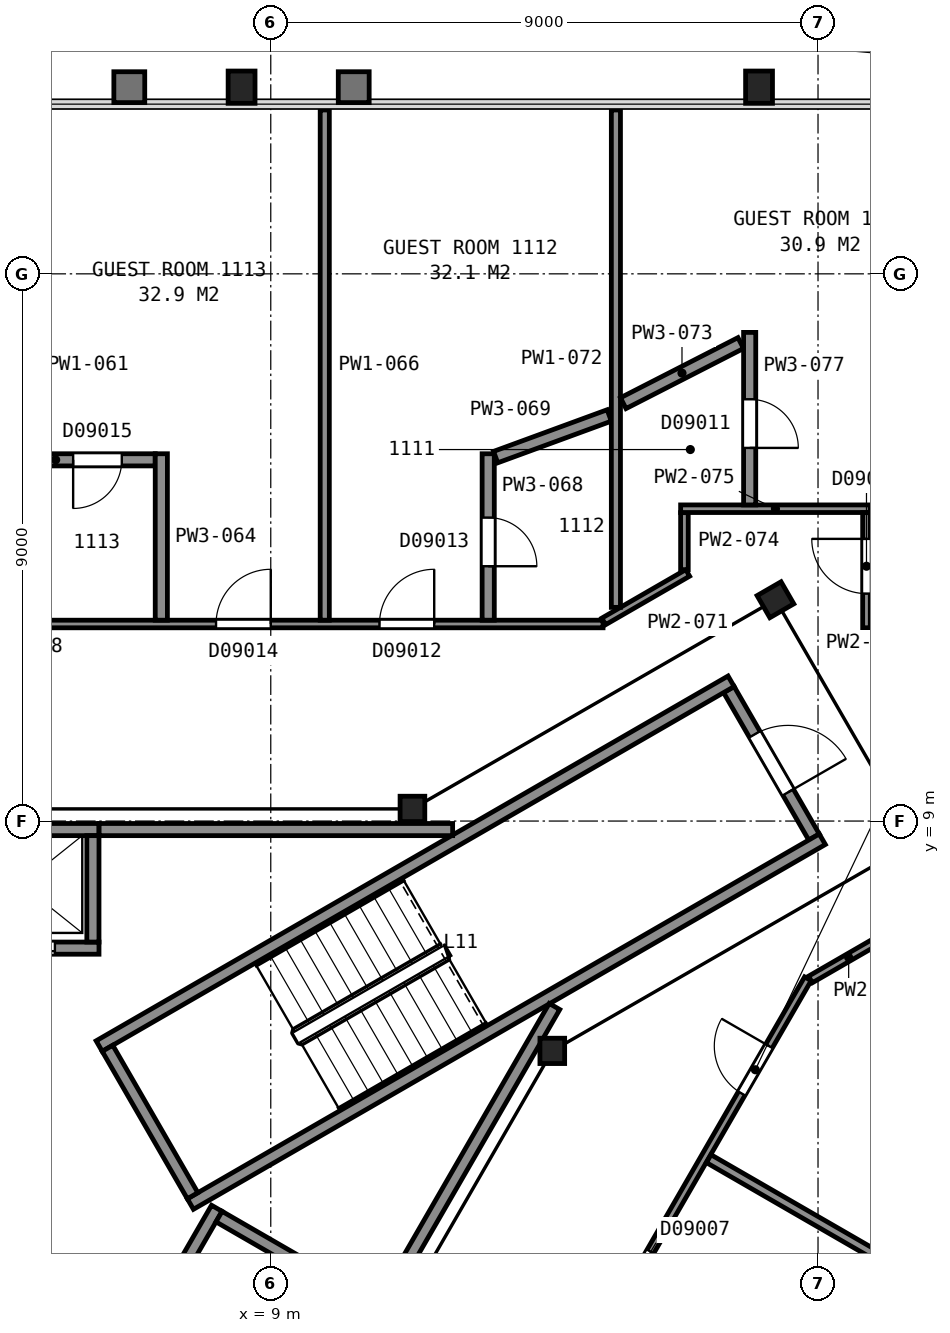
"""IFC4 building model, lengths in metres.
Left out: names, types, materials, properties, quantities, classifications, styles, units other than length and angle.
Written with IfcOpenShell. Run it as: python <this file> out.ifc"""

import sys

from ifc_helpers import new_model, si_unit, direction, frame, frame_2d, origin, origin_2d, place, context, subcontext, project, spatial, rectangle, i_section, extrude, element, fill, save


model = new_model("IFC4")
c1 = context("Model", 3, precision=1e-05, world=origin(), true_north=direction((0.0, 1.0)))
c2 = subcontext(c1, "Body", "Model", "MODEL_VIEW")
j1 = project(units=[si_unit("LENGTHUNIT", "METRE"), si_unit("PLANEANGLEUNIT", "RADIAN")], contexts=[c1])
p1 = place(None, origin())
s1 = spatial("IfcSite", under=j1, at=p1, CompositionType="ELEMENT")
p2 = place(p1, origin())
s2 = spatial("IfcBuilding", under=s1, at=p2, CompositionType="ELEMENT")
p3 = place(p2, frame((0.0, 0.0, 54.8)))
s3 = spatial("IfcBuildingStorey", under=s2, at=p3, CompositionType="ELEMENT", Elevation=54.8)
for number, where, z_axis, x_axis in (
    (1, (17.03, 21.07, 0.0), (0.0, 0.0, 1.0), (1.0, 0.0, 0.0)),
    (2, (8.52, 21.07, 0.0), (0.0, 0.0, 1.0), (1.0, 0.0, 0.0)),
):
    element("IfcColumn", number, at=place(p3, frame(where, z_axis=z_axis, x_axis=x_axis)), inside=s3, PredefinedType="COLUMN", context=c2, shape_type="SweptSolid", body=[
        extrude(i_section(OverallWidth=0.442, OverallDepth=0.531, WebThickness=0.066, FlangeThickness=0.106, FilletRadius=0.015, at=origin_2d()), origin(), (0.0, 0.0, 1.0), 3.6),
    ])
p4 = place(p3, frame((13.63, 5.22, 0.0), z_axis=(0.0, 0.0, 1.0), x_axis=(1.0, 0.0, 0.0)))
e3 = element("IfcColumn", 3, at=p4, inside=s3, PredefinedType="COLUMN", context=c2, shape_type="SweptSolid", body=[
    extrude(i_section(OverallWidth=0.406, OverallDepth=0.417, WebThickness=0.03, FlangeThickness=0.048, FilletRadius=0.015, at=origin_2d()), origin(), (0.0, 0.0, 1.0), 3.6),
])
p5 = place(p3, frame((17.3, 12.64, 0.0), z_axis=(0.0, 0.0, 1.0), x_axis=(0.5, -0.866025403784, 0.0)))
e4 = element("IfcColumn", 4, at=p5, inside=s3, PredefinedType="COLUMN", context=c2, shape_type="SweptSolid", body=[
    extrude(i_section(OverallWidth=0.419, OverallDepth=0.455, WebThickness=0.042, FlangeThickness=0.068, FilletRadius=0.015, at=origin_2d()), origin(), (0.0, 0.0, 1.0), 3.6),
])
p6 = place(p3, frame((11.33, 9.2, 0.0), z_axis=(0.0, 0.0, 1.0), x_axis=(1.0, 0.0, 0.0)))
e5 = element("IfcColumn", 5, at=p6, inside=s3, PredefinedType="COLUMN", context=c2, shape_type="SweptSolid", body=[
    extrude(i_section(OverallWidth=0.406, OverallDepth=0.417, WebThickness=0.03, FlangeThickness=0.048, FilletRadius=0.015, at=origin_2d()), origin(), (0.0, 0.0, 1.0), 3.6),
])
p7 = place(p3, frame((17.934, 8.738, 0.0), z_axis=(0.0, 0.0, 1.0), x_axis=(-0.49998411664, 0.866034573852, 0.0)))
e6 = element("IfcWall", 6, at=p7, inside=s3, PredefinedType="PARTITIONING", context=c2, shape_type="SweptSolid", body=[
    extrude(rectangle(XDim=2.8, YDim=0.2, at=frame_2d((1.4, 0.0))), origin(), (0.0, 0.0, 1.0), 3.35),
])
p8 = place(p7, frame((0.85, 0.0, 0.0)))
e7 = element("IfcOpeningElement", 7, at=p8, cuts=e6, PredefinedType="OPENING", context=c2, shape_type="SweptSolid", body=[
    extrude(rectangle(XDim=1.1, YDim=2.1, at=frame_2d((0.55, 1.05))), frame((0.0, 0.11, 0.0), z_axis=(0.0, -1.0, 0.0), x_axis=(1.0, 0.0, 0.0)), (0.0, 0.0, 1.0), 0.22),
])
for number, where, z_axis, x_axis in (
    (8, (6.178, 5.299, 0.0), (0.0, 0.0, 1.0), (0.866, 0.5, 0.0)),
    (9, (7.678, 2.701, 0.0), (0.0, 0.0, 1.0), (0.866, 0.5, 0.0)),
):
    element("IfcWall", number, at=place(p3, frame(where, z_axis=z_axis, x_axis=x_axis)), inside=s3, PredefinedType="PARTITIONING", context=c2, shape_type="SweptSolid", body=[
        extrude(rectangle(XDim=12.0, YDim=0.2, at=frame_2d((6.0, 0.0))), origin(), (0.0, 0.0, 1.0), 3.35),
    ])
p9 = place(p3, frame((7.715, 2.838, 0.0), z_axis=(0.0, 0.0, 1.0), x_axis=(-0.500049511043, 0.865996816683, 0.0)))
e10 = element("IfcWall", 10, at=p9, inside=s3, PredefinedType="PARTITIONING", context=c2, shape_type="SweptSolid", body=[
    extrude(rectangle(XDim=2.8, YDim=0.2, at=frame_2d((1.4, 0.0))), origin(), (0.0, 0.0, 1.0), 3.35),
])
p10 = place(p3, frame((3.625, 6.91, 0.0), z_axis=(0.0, 0.0, 1.0), x_axis=(1.0, 0.0, 0.0)))
e11 = element("IfcWall", 11, at=p10, inside=s3, PredefinedType="PARTITIONING", context=c2, shape_type="SweptSolid", body=[
    extrude(rectangle(XDim=2.55, YDim=0.2, at=frame_2d((1.275, 0.0))), origin(), (0.0, 0.0, 1.0), 3.6),
])
p11 = place(p10, frame((0.725, 0.0, 0.0)))
e12 = element("IfcOpeningElement", 12, at=p11, cuts=e11, PredefinedType="OPENING", context=c2, shape_type="SweptSolid", body=[
    extrude(rectangle(XDim=1.1, YDim=2.1, at=frame_2d((0.55, 1.05))), frame((0.0, 0.11, 0.0), z_axis=(0.0, -1.0, 0.0), x_axis=(1.0, 0.0, 0.0)), (0.0, 0.0, 1.0), 0.22),
])
p12 = place(p3, frame((3.625, 8.86, 0.0), z_axis=(0.0, 0.0, 1.0), x_axis=(1.0, 0.0, 0.0)))
e13 = element("IfcWall", 13, at=p12, inside=s3, PredefinedType="PARTITIONING", context=c2, shape_type="SweptSolid", body=[
    extrude(rectangle(XDim=2.55, YDim=0.2, at=frame_2d((1.275, 0.0))), origin(), (0.0, 0.0, 1.0), 3.6),
])
p13 = place(p3, frame((5.663, -1.612, 0.0), z_axis=(0.0, 0.0, 1.0), x_axis=(0.49998122708, 0.866036242063, 0.0)))
e14 = element("IfcWall", 14, at=p13, inside=s3, PredefinedType="PARTITIONING", context=c2, shape_type="SweptSolid", body=[
    extrude(rectangle(XDim=4.9, YDim=0.2, at=frame_2d((2.45, 0.0))), origin(), (0.0, 0.0, 1.0), 3.6),
])
p14 = place(p3, frame((6.075, 7.01, 0.0), z_axis=(0.0, 0.0, 1.0), x_axis=(0.0, 1.0, 0.0)))
e15 = element("IfcWall", 15, at=p14, inside=s3, PredefinedType="PARTITIONING", context=c2, shape_type="SweptSolid", body=[
    extrude(rectangle(XDim=1.75, YDim=0.2, at=frame_2d((0.875, 0.0))), origin(), (0.0, 0.0, 1.0), 3.6),
])
p15 = place(p3, frame((9.665, 1.62, 0.0), z_axis=(0.0, 0.0, 1.0), x_axis=(-0.866002029911, 0.500040482552, 0.0)))
e16 = element("IfcWall", 16, at=p15, inside=s3, PredefinedType="PARTITIONING", context=c2, shape_type="SweptSolid", body=[
    extrude(rectangle(XDim=1.75, YDim=0.2, at=frame_2d((0.875, 0.0))), origin(), (0.0, 0.0, 1.0), 3.6),
])
p16 = place(p3, frame((6.177, 8.86, 0.0), z_axis=(0.0, 0.0, 1.0), x_axis=(1.0, 0.0, 0.0)))
e17 = element("IfcWall", 17, at=p16, inside=s3, PredefinedType="PARTITIONING", context=c2, shape_type="SweptSolid", body=[
    extrude(rectangle(XDim=5.814, YDim=0.2, at=frame_2d((2.907, 0.0))), origin(), (0.0, 0.0, 1.0), 3.35),
])
p17 = place(p3, frame((8.492, -3.012, 0.0), z_axis=(0.0, 0.0, 1.0), x_axis=(0.499972957231, 0.866041016371, 0.0)))
e18 = element("IfcWall", 18, at=p17, inside=s3, PredefinedType="PARTITIONING", context=c2, shape_type="SweptSolid", body=[
    extrude(rectangle(XDim=10.349, YDim=0.2, at=frame_2d((5.174, 0.0))), origin(), (0.0, 0.0, 1.0), 3.35),
])
p18 = place(p3, frame((-14.465, 12.241, 0.0), z_axis=(0.0, 0.0, 1.0), x_axis=(1.0, 0.0, 0.0)))
e19 = element("IfcWall", 19, at=p18, inside=s3, PredefinedType="PARTITIONING", context=c2, shape_type="SweptSolid", body=[
    extrude(rectangle(XDim=28.929, YDim=0.125, at=frame_2d((14.465, 0.0))), origin(), (0.0, 0.0, 1.0), 2.613),
])
p19 = place(p18, frame((25.252, 0.0, 0.0)))
e20 = element("IfcOpeningElement", 20, at=p19, cuts=e19, PredefinedType="OPENING", context=c2, shape_type="SweptSolid", body=[
    extrude(rectangle(XDim=0.9, YDim=2.1, at=frame_2d((0.45, 1.05))), frame((0.0, 0.073, 0.0), z_axis=(0.0, -1.0, 0.0), x_axis=(1.0, 0.0, 0.0)), (0.0, 0.0, 1.0), 0.145),
])
p20 = place(p18, frame((22.564, 0.0, 0.0)))
e21 = element("IfcOpeningElement", 21, at=p20, cuts=e19, PredefinedType="OPENING", context=c2, shape_type="SweptSolid", body=[
    extrude(rectangle(XDim=0.9, YDim=2.1, at=frame_2d((0.45, 1.05))), frame((0.0, 0.073, 0.0), z_axis=(0.0, -1.0, 0.0), x_axis=(1.0, 0.0, 0.0)), (0.0, 0.0, 1.0), 0.145),
])
p21 = place(p18, frame((15.302, 0.0, 0.0)))
e22 = element("IfcOpeningElement", 22, at=p21, cuts=e19, PredefinedType="OPENING", context=c2, shape_type="SweptSolid", body=[
    extrude(rectangle(XDim=0.9, YDim=2.1, at=frame_2d((0.45, 1.05))), frame((0.0, 0.073, 0.0), z_axis=(0.0, -1.0, 0.0), x_axis=(1.0, 0.0, 0.0)), (0.0, 0.0, 1.0), 0.145),
])
p22 = place(p18, frame((12.365, 0.0, 0.0)))
e23 = element("IfcOpeningElement", 23, at=p22, cuts=e19, PredefinedType="OPENING", context=c2, shape_type="SweptSolid", body=[
    extrude(rectangle(XDim=0.9, YDim=2.1, at=frame_2d((0.45, 1.05))), frame((0.0, 0.073, 0.0), z_axis=(0.0, -1.0, 0.0), x_axis=(1.0, 0.0, 0.0)), (0.0, 0.0, 1.0), 0.145),
])
p23 = place(p18, frame((5.477, 0.0, 0.0)))
e24 = element("IfcOpeningElement", 24, at=p23, cuts=e19, PredefinedType="OPENING", context=c2, shape_type="SweptSolid", body=[
    extrude(rectangle(XDim=0.9, YDim=2.1, at=frame_2d((0.45, 1.05))), frame((0.0, 0.073, 0.0), z_axis=(0.0, -1.0, 0.0), x_axis=(1.0, 0.0, 0.0)), (0.0, 0.0, 1.0), 0.145),
])
p24 = place(p18, frame((2.789, 0.0, 0.0)))
e25 = element("IfcOpeningElement", 25, at=p24, cuts=e19, PredefinedType="OPENING", context=c2, shape_type="SweptSolid", body=[
    extrude(rectangle(XDim=0.9, YDim=2.1, at=frame_2d((0.45, 1.05))), frame((0.0, 0.073, 0.0), z_axis=(0.0, -1.0, 0.0), x_axis=(1.0, 0.0, 0.0)), (0.0, 0.0, 1.0), 0.145),
])
p25 = place(p3, frame((17.833, 6.406, 0.0), z_axis=(0.0, 0.0, 1.0), x_axis=(-0.500002884005, -0.866023738697, 0.0)))
e26 = element("IfcWall", 26, at=p25, inside=s3, PredefinedType="PARTITIONING", context=c2, shape_type="SweptSolid", body=[
    extrude(rectangle(XDim=28.135, YDim=0.125, at=frame_2d((14.067, 0.0))), origin(), (0.0, 0.0, 1.0), 2.613),
])
p26 = place(p25, frame((26.522, 0.0, 0.0)))
e27 = element("IfcOpeningElement", 27, at=p26, cuts=e26, PredefinedType="OPENING", context=c2, shape_type="SweptSolid", body=[
    extrude(rectangle(XDim=0.9, YDim=2.1, at=frame_2d((0.45, 1.05))), frame((0.0, 0.073, 0.0), z_axis=(0.0, -1.0, 0.0), x_axis=(1.0, 0.0, 0.0)), (0.0, 0.0, 1.0), 0.145),
])
p27 = place(p25, frame((23.184, 0.0, 0.0)))
e28 = element("IfcOpeningElement", 28, at=p27, cuts=e26, PredefinedType="OPENING", context=c2, shape_type="SweptSolid", body=[
    extrude(rectangle(XDim=0.9, YDim=2.1, at=frame_2d((0.45, 1.05))), frame((0.0, 0.073, 0.0), z_axis=(0.0, -1.0, 0.0), x_axis=(1.0, 0.0, 0.0)), (0.0, 0.0, 1.0), 0.145),
])
p28 = place(p25, frame((18.683, 0.0, 0.0)))
e29 = element("IfcOpeningElement", 29, at=p28, cuts=e26, PredefinedType="OPENING", context=c2, shape_type="SweptSolid", body=[
    extrude(rectangle(XDim=0.9, YDim=2.1, at=frame_2d((0.45, 1.05))), frame((0.0, 0.073, 0.0), z_axis=(0.0, -1.0, 0.0), x_axis=(1.0, 0.0, 0.0)), (0.0, 0.0, 1.0), 0.145),
])
p29 = place(p25, frame((14.182, 0.0, 0.0)))
e30 = element("IfcOpeningElement", 30, at=p29, cuts=e26, PredefinedType="OPENING", context=c2, shape_type="SweptSolid", body=[
    extrude(rectangle(XDim=0.9, YDim=2.1, at=frame_2d((0.45, 1.05))), frame((0.0, 0.073, 0.0), z_axis=(0.0, -1.0, 0.0), x_axis=(1.0, 0.0, 0.0)), (0.0, 0.0, 1.0), 0.145),
])
p30 = place(p25, frame((9.681, 0.0, 0.0)))
e31 = element("IfcOpeningElement", 31, at=p30, cuts=e26, PredefinedType="OPENING", context=c2, shape_type="SweptSolid", body=[
    extrude(rectangle(XDim=0.9, YDim=2.1, at=frame_2d((0.45, 1.05))), frame((0.0, 0.073, 0.0), z_axis=(0.0, -1.0, 0.0), x_axis=(1.0, 0.0, 0.0)), (0.0, 0.0, 1.0), 0.145),
])
p31 = place(p25, frame((5.18, 0.0, 0.0)))
e32 = element("IfcOpeningElement", 32, at=p31, cuts=e26, PredefinedType="OPENING", context=c2, shape_type="SweptSolid", body=[
    extrude(rectangle(XDim=0.9, YDim=2.1, at=frame_2d((0.45, 1.05))), frame((0.0, 0.073, 0.0), z_axis=(0.0, -1.0, 0.0), x_axis=(1.0, 0.0, 0.0)), (0.0, 0.0, 1.0), 0.145),
])
p32 = place(p25, frame((1.278, 0.0, 0.0)))
e33 = element("IfcOpeningElement", 33, at=p32, cuts=e26, PredefinedType="OPENING", context=c2, shape_type="SweptSolid", body=[
    extrude(rectangle(XDim=0.9, YDim=2.1, at=frame_2d((0.45, 1.05))), frame((0.0, 0.073, 0.0), z_axis=(0.0, -1.0, 0.0), x_axis=(1.0, 0.0, 0.0)), (0.0, 0.0, 1.0), 0.145),
])
p33 = place(p3, frame((7.1, 14.941, 0.0), z_axis=(0.0, 0.0, 1.0), x_axis=(-1.0, 0.0, 0.0)))
e34 = element("IfcWall", 34, at=p33, inside=s3, PredefinedType="PARTITIONING", context=c2, shape_type="SweptSolid", body=[
    extrude(rectangle(XDim=1.925, YDim=0.2, at=frame_2d((0.962, 0.0))), origin(), (0.0, 0.0, 1.0), 2.613),
])
p34 = place(p33, frame((0.55, 0.0, 0.0)))
e35 = element("IfcOpeningElement", 35, at=p34, cuts=e34, PredefinedType="OPENING", context=c2, shape_type="SweptSolid", body=[
    extrude(rectangle(XDim=0.8, YDim=2.1, at=frame_2d((0.4, 1.05))), frame((0.0, 0.11, 0.0), z_axis=(0.0, -1.0, 0.0), x_axis=(1.0, 0.0, 0.0)), (0.0, 0.0, 1.0), 0.22),
])
p35 = place(p3, frame((7.2, 12.303, 0.0), z_axis=(0.0, 0.0, 1.0), x_axis=(0.0, 1.0, 0.0)))
e36 = element("IfcWall", 36, at=p35, inside=s3, PredefinedType="PARTITIONING", context=c2, shape_type="SweptSolid", body=[
    extrude(rectangle(XDim=2.738, YDim=0.2, at=frame_2d((1.369, 0.0))), origin(), (0.0, 0.0, 1.0), 2.613),
])
p36 = place(p3, frame((9.888, 12.303, 0.0), z_axis=(0.0, 0.0, 1.0), x_axis=(0.0, 1.0, 0.0)))
e37 = element("IfcWall", 37, at=p36, inside=s3, PredefinedType="PARTITIONING", context=c2, shape_type="SweptSolid", body=[
    extrude(rectangle(XDim=8.392, YDim=0.15, at=frame_2d((4.196, 0.0))), origin(), (0.0, 0.0, 1.0), 2.613),
])
p37 = place(p3, frame((12.576, 15.041, 0.0), z_axis=(0.0, 0.0, 1.0), x_axis=(0.0, -1.0, 0.0)))
e38 = element("IfcWall", 38, at=p37, inside=s3, PredefinedType="PARTITIONING", context=c2, shape_type="SweptSolid", body=[
    extrude(rectangle(XDim=2.738, YDim=0.2, at=frame_2d((1.369, 0.0))), origin(), (0.0, 0.0, 1.0), 2.613),
])
p38 = place(p37, frame((1.05, 0.0, 0.0)))
e39 = element("IfcOpeningElement", 39, at=p38, cuts=e38, PredefinedType="OPENING", context=c2, shape_type="SweptSolid", body=[
    extrude(rectangle(XDim=0.8, YDim=2.1, at=frame_2d((0.4, 1.05))), frame((0.0, 0.11, 0.0), z_axis=(0.0, -1.0, 0.0), x_axis=(1.0, 0.0, 0.0)), (0.0, 0.0, 1.0), 0.22),
])
p39 = place(p3, frame((12.698, 14.986, 0.0), z_axis=(0.0, 0.0, 1.0), x_axis=(0.938894816734, 0.344204188105, 0.0)))
e40 = element("IfcWall", 40, at=p39, inside=s3, PredefinedType="PARTITIONING", context=c2, shape_type="SweptSolid", body=[
    extrude(rectangle(XDim=1.99, YDim=0.2, at=frame_2d((0.995, 0.0))), origin(), (0.0, 0.0, 1.0), 2.613),
])
p40 = place(p3, frame((14.476, 12.283, 0.0), z_axis=(0.0, 0.0, 1.0), x_axis=(0.865974057503, 0.500088923824, 0.0)))
e41 = element("IfcWall", 41, at=p40, inside=s3, PredefinedType="PARTITIONING", context=c2, shape_type="SweptSolid", body=[
    extrude(rectangle(XDim=1.595, YDim=0.125, at=frame_2d((0.798, 0.0))), origin(), (0.0, 0.0, 1.0), 2.613),
])
p41 = place(p3, frame((14.676, 12.514, 0.0), z_axis=(0.0, 0.0, 1.0), x_axis=(0.0, 1.0, 0.0)))
e42 = element("IfcWall", 42, at=p41, inside=s3, PredefinedType="PARTITIONING", context=c2, shape_type="SweptSolid", body=[
    extrude(rectangle(XDim=8.181, YDim=0.15, at=frame_2d((4.09, 0.0))), origin(), (0.0, 0.0, 1.0), 2.613),
])
p42 = place(p3, frame((14.797, 15.873, 0.0), z_axis=(0.0, 0.0, 1.0), x_axis=(0.890181338078, 0.455606392995, 0.0)))
e43 = element("IfcWall", 43, at=p42, inside=s3, PredefinedType="PARTITIONING", context=c2, shape_type="SweptSolid", body=[
    extrude(rectangle(XDim=2.171, YDim=0.2, at=frame_2d((1.085, 0.0))), origin(), (0.0, 0.0, 1.0), 2.613),
])
p43 = place(p3, frame((15.803, 13.135, 0.0), z_axis=(0.0, 0.0, 1.0), x_axis=(0.0, 1.0, 0.0)))
e44 = element("IfcWall", 44, at=p43, inside=s3, PredefinedType="PARTITIONING", context=c2, shape_type="SweptSolid", body=[
    extrude(rectangle(XDim=0.937, YDim=0.125, at=frame_2d((0.469, 0.0))), origin(), (0.0, 0.0, 1.0), 2.613),
])
p44 = place(p3, frame((15.74, 14.137, 0.0), z_axis=(0.0, 0.0, 1.0), x_axis=(1.0, 0.0, 0.0)))
e45 = element("IfcWall", 45, at=p44, inside=s3, PredefinedType="PARTITIONING", context=c2, shape_type="SweptSolid", body=[
    extrude(rectangle(XDim=3.119, YDim=0.125, at=frame_2d((1.56, 0.0))), origin(), (0.0, 0.0, 1.0), 2.613),
])
p45 = place(p3, frame((16.202, 3.447, 0.0), z_axis=(0.0, 0.0, 1.0), x_axis=(0.866047434595, -0.499961839574, 0.0)))
e46 = element("IfcWall", 46, at=p45, inside=s3, PredefinedType="PARTITIONING", context=c2, shape_type="SweptSolid", body=[
    extrude(rectangle(XDim=8.387, YDim=0.15, at=frame_2d((4.193, 0.0))), origin(), (0.0, 0.0, 1.0), 2.613),
])
p46 = place(p3, frame((16.876, 14.199, 0.0), z_axis=(0.0, 0.0, 1.0), x_axis=(0.0, 1.0, 0.0)))
e47 = element("IfcWall", 47, at=p46, inside=s3, PredefinedType="PARTITIONING", context=c2, shape_type="SweptSolid", body=[
    extrude(rectangle(XDim=2.838, YDim=0.2, at=frame_2d((1.419, 0.0))), origin(), (0.0, 0.0, 1.0), 2.613),
])
p47 = place(p46, frame((0.938, 0.0, 0.0)))
e48 = element("IfcOpeningElement", 48, at=p47, cuts=e47, PredefinedType="OPENING", context=c2, shape_type="SweptSolid", body=[
    extrude(rectangle(XDim=0.8, YDim=2.1, at=frame_2d((0.4, 1.05))), frame((0.0, 0.11, 0.0), z_axis=(0.0, -1.0, 0.0), x_axis=(1.0, 0.0, 0.0)), (0.0, 0.0, 1.0), 0.22),
])
p48 = place(p3, frame((17.875, 6.395, 0.0), z_axis=(0.0, 0.0, 1.0), x_axis=(0.865894215669, 0.500227155672, 0.0)))
e49 = element("IfcWall", 49, at=p48, inside=s3, PredefinedType="PARTITIONING", context=c2, shape_type="SweptSolid", body=[
    extrude(rectangle(XDim=1.451, YDim=0.125, at=frame_2d((0.726, 0.0))), origin(), (0.0, 0.0, 1.0), 2.613),
])
p49 = place(p3, frame((18.797, 14.072, 0.0), z_axis=(0.0, 0.0, 1.0), x_axis=(0.0, -1.0, 0.0)))
e50 = element("IfcWall", 50, at=p49, inside=s3, PredefinedType="PARTITIONING", context=c2, shape_type="SweptSolid", body=[
    extrude(rectangle(XDim=1.894, YDim=0.125, at=frame_2d((0.947, 0.0))), origin(), (0.0, 0.0, 1.0), 2.613),
])
p50 = place(p49, frame((0.431, 0.0, 0.0)))
e51 = element("IfcOpeningElement", 51, at=p50, cuts=e50, PredefinedType="OPENING", context=c2, shape_type="SweptSolid", body=[
    extrude(rectangle(XDim=0.9, YDim=2.1, at=frame_2d((0.45, 1.05))), frame((0.0, 0.073, 0.0), z_axis=(0.0, -1.0, 0.0), x_axis=(1.0, 0.0, 0.0)), (0.0, 0.0, 1.0), 0.145),
])
p51 = place(p8, origin())
e52 = element("IfcDoor", 52, at=p51, inside=s3, OperationType="SINGLE_SWING_LEFT", PredefinedType="DOOR", context=c2, shape_type="SweptSolid", body=[
    extrude(rectangle(XDim=1.1, YDim=2.1, at=frame_2d((0.55, 1.05))), frame((0.0, 0.025, 0.0), z_axis=(0.0, -1.0, 0.0), x_axis=(1.0, 0.0, 0.0)), (0.0, 0.0, 1.0), 0.05),
])
fill(e7, e52)
p52 = place(p11, origin())
e53 = element("IfcDoor", 53, at=p52, inside=s3, OperationType="SLIDING_TO_LEFT", PredefinedType="DOOR", context=c2, shape_type="SweptSolid", body=[
    extrude(rectangle(XDim=1.1, YDim=2.1, at=frame_2d((0.55, 1.05))), frame((0.0, 0.025, 0.0), z_axis=(0.0, -1.0, 0.0), x_axis=(1.0, 0.0, 0.0)), (0.0, 0.0, 1.0), 0.05),
])
fill(e12, e53)
p53 = place(p19, origin())
e54 = element("IfcDoor", 54, at=p53, inside=s3, OperationType="SINGLE_SWING_RIGHT", PredefinedType="DOOR", context=c2, shape_type="SweptSolid", body=[
    extrude(rectangle(XDim=0.9, YDim=2.1, at=frame_2d((0.45, 1.05))), frame((0.0, 0.025, 0.0), z_axis=(0.0, -1.0, 0.0), x_axis=(1.0, 0.0, 0.0)), (0.0, 0.0, 1.0), 0.05),
])
fill(e20, e54)
p54 = place(p20, origin())
e55 = element("IfcDoor", 55, at=p54, inside=s3, OperationType="SINGLE_SWING_RIGHT", PredefinedType="DOOR", context=c2, shape_type="SweptSolid", body=[
    extrude(rectangle(XDim=0.9, YDim=2.1, at=frame_2d((0.45, 1.05))), frame((0.0, 0.025, 0.0), z_axis=(0.0, -1.0, 0.0), x_axis=(1.0, 0.0, 0.0)), (0.0, 0.0, 1.0), 0.05),
])
fill(e21, e55)
p55 = place(p31, origin())
e56 = element("IfcDoor", 56, at=p55, inside=s3, OperationType="SINGLE_SWING_RIGHT", PredefinedType="DOOR", context=c2, shape_type="SweptSolid", body=[
    extrude(rectangle(XDim=0.9, YDim=2.1, at=frame_2d((0.45, 1.05))), frame((0.0, 0.025, 0.0), z_axis=(0.0, -1.0, 0.0), x_axis=(1.0, 0.0, 0.0)), (0.0, 0.0, 1.0), 0.05),
])
fill(e32, e56)
p56 = place(p32, origin())
e57 = element("IfcDoor", 57, at=p56, inside=s3, OperationType="SINGLE_SWING_LEFT", PredefinedType="DOOR", context=c2, shape_type="SweptSolid", body=[
    extrude(rectangle(XDim=0.9, YDim=2.1, at=frame_2d((0.45, 1.05))), frame((0.0, 0.025, 0.0), z_axis=(0.0, -1.0, 0.0), x_axis=(1.0, 0.0, 0.0)), (0.0, 0.0, 1.0), 0.05),
])
fill(e33, e57)
p57 = place(p34, origin())
e58 = element("IfcDoor", 58, at=p57, inside=s3, OperationType="SINGLE_SWING_RIGHT", PredefinedType="DOOR", context=c2, shape_type="SweptSolid", body=[
    extrude(rectangle(XDim=0.8, YDim=2.1, at=frame_2d((0.4, 1.05))), frame((0.0, 0.025, 0.0), z_axis=(0.0, -1.0, 0.0), x_axis=(1.0, 0.0, 0.0)), (0.0, 0.0, 1.0), 0.05),
])
fill(e35, e58)
p58 = place(p38, origin())
e59 = element("IfcDoor", 59, at=p58, inside=s3, OperationType="SINGLE_SWING_RIGHT", PredefinedType="DOOR", context=c2, shape_type="SweptSolid", body=[
    extrude(rectangle(XDim=0.8, YDim=2.1, at=frame_2d((0.4, 1.05))), frame((0.0, 0.025, 0.0), z_axis=(0.0, -1.0, 0.0), x_axis=(1.0, 0.0, 0.0)), (0.0, 0.0, 1.0), 0.05),
])
fill(e39, e59)
p59 = place(p47, origin())
e60 = element("IfcDoor", 60, at=p59, inside=s3, OperationType="SINGLE_SWING_LEFT", PredefinedType="DOOR", context=c2, shape_type="SweptSolid", body=[
    extrude(rectangle(XDim=0.8, YDim=2.1, at=frame_2d((0.4, 1.05))), frame((0.0, 0.025, 0.0), z_axis=(0.0, -1.0, 0.0), x_axis=(1.0, 0.0, 0.0)), (0.0, 0.0, 1.0), 0.05),
])
fill(e48, e60)
p60 = place(p50, origin())
e61 = element("IfcDoor", 61, at=p60, inside=s3, OperationType="SINGLE_SWING_LEFT", PredefinedType="DOOR", context=c2, shape_type="SweptSolid", body=[
    extrude(rectangle(XDim=0.9, YDim=2.1, at=frame_2d((0.45, 1.05))), frame((0.0, 0.025, 0.0), z_axis=(0.0, -1.0, 0.0), x_axis=(1.0, 0.0, 0.0)), (0.0, 0.0, 1.0), 0.05),
])
fill(e51, e61)
save(model, sys.argv[1])
